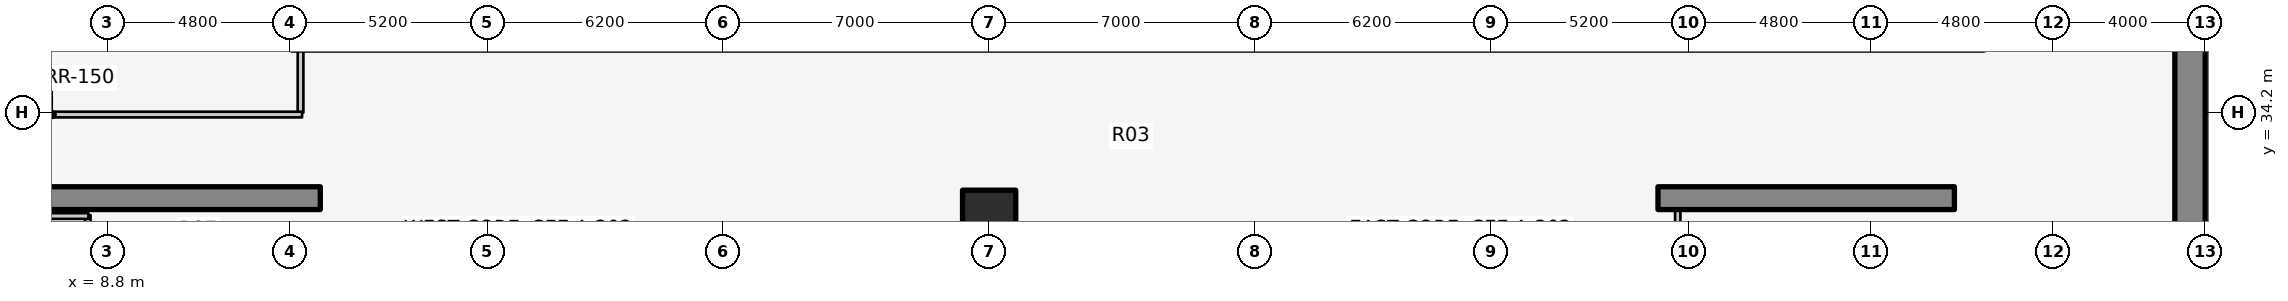
"""IFC4 building model, lengths in metres.
Left out: names, types, materials, properties, quantities, classifications, styles, units other than length and angle.
Written with IfcOpenShell. Run it as: python <this file> out.ifc"""

import sys

from ifc_helpers import new_model, si_unit, direction, frame, frame_2d, origin, origin_2d, place, context, subcontext, project, spatial, rectangle, extrude, element, save


model = new_model("IFC4")
c1 = context("Model", 3, precision=1e-05, world=origin(), true_north=direction((0.0, 1.0)))
c2 = subcontext(c1, "Body", "Model", "MODEL_VIEW")
j1 = project(units=[si_unit("LENGTHUNIT", "METRE"), si_unit("PLANEANGLEUNIT", "RADIAN")], contexts=[c1])
p1 = place(None, origin())
s1 = spatial("IfcSite", under=j1, at=p1, CompositionType="ELEMENT")
p2 = place(p1, origin())
s2 = spatial("IfcBuilding", under=s1, at=p2, CompositionType="ELEMENT")
p3 = place(p2, frame((0.0, 0.0, -5.4)))
s3 = spatial("IfcBuildingStorey", under=s2, at=p3, CompositionType="ELEMENT", Elevation=-5.4)
p4 = place(p3, frame((63.6, 15.6, 0.0), z_axis=(0.0, 0.0, 1.0), x_axis=(0.0, 1.0, 0.0)))
e1 = element("IfcWall", 1, at=p4, inside=s3, PredefinedType="USERDEFINED", context=c2, shape_type="SweptSolid", body=[
    extrude(rectangle(XDim=29.55, YDim=0.8, at=frame_2d((14.775, 0.0))), origin(), (0.0, 0.0, 1.0), 5.4),
])
for number, where, z_axis, x_axis in (
    (2, (6.6, 31.95, 0.0), (0.0, 0.0, 1.0), (1.0, 0.0, 0.0)),
    (3, (49.6, 31.95, 0.0), (0.0, 0.0, 1.0), (1.0, 0.0, 0.0)),
):
    element("IfcWall", number, at=place(p3, frame(where, z_axis=z_axis, x_axis=x_axis)), inside=s3, PredefinedType="SOLIDWALL", context=c2, shape_type="SweptSolid", body=[
        extrude(rectangle(XDim=7.8, YDim=0.6, at=frame_2d((3.9, 0.0))), origin(), (0.0, 0.0, 1.0), 5.4),
    ])
p5 = place(p3, frame((32.0, 31.46, 0.0), z_axis=(0.0, 0.0, 1.0), x_axis=(1.0, 0.0, 0.0)))
e4 = element("IfcColumn", 4, at=p5, inside=s3, PredefinedType="COLUMN", context=c2, shape_type="SweptSolid", body=[
    extrude(rectangle(XDim=1.4, YDim=1.4, at=origin_2d()), origin(), (0.0, 0.0, 1.0), 5.4),
])
p6 = place(p3, frame((13.88, 34.2, 0.0), z_axis=(0.0, 0.0, 1.0), x_axis=(0.0, 1.0, 0.0)))
e5 = element("IfcWall", 5, at=p6, inside=s3, PredefinedType="PARTITIONING", context=c2, shape_type="SweptSolid", body=[
    extrude(rectangle(XDim=11.02, YDim=0.15, at=frame_2d((5.51, 0.0))), origin(), (0.0, 0.0, 1.0), 4.1),
])
p7 = place(p6, frame((2.082, 0.0, 0.0)))
e6 = element("IfcOpeningElement", 6, at=p7, cuts=e5, PredefinedType="OPENING", context=c2, shape_type="SweptSolid", body=[
    extrude(rectangle(XDim=0.85, YDim=2.05, at=frame_2d((0.425, 1.025))), frame((0.0, 0.085, 0.0), z_axis=(0.0, -1.0, 0.0), x_axis=(1.0, 0.0, 0.0)), (0.0, 0.0, 1.0), 0.17),
])
p8 = place(p3, frame((0.78, 34.15, 0.0), z_axis=(0.0, 0.0, 1.0), x_axis=(1.0, 0.0, 0.0)))
e7 = element("IfcWall", 7, at=p8, inside=s3, PredefinedType="PARTITIONING", context=c2, shape_type="SweptSolid", body=[
    extrude(rectangle(XDim=13.14, YDim=0.15, at=frame_2d((6.57, 0.0))), origin(), (0.0, 0.0, 1.0), 4.1),
])
p9 = place(p3, frame((8.28, 25.3, 0.0), z_axis=(0.0, 0.0, 1.0), x_axis=(0.0, 1.0, 0.0)))
e8 = element("IfcWall", 8, at=p9, inside=s3, PredefinedType="PARTITIONING", context=c2, shape_type="SweptSolid", body=[
    extrude(rectangle(XDim=6.2, YDim=0.15, at=frame_2d((3.1, 0.0))), origin(), (0.0, 0.0, 1.0), 5.055),
])
p10 = place(p9, frame((2.5, 0.0, 0.0)))
e9 = element("IfcOpeningElement", 9, at=p10, cuts=e8, PredefinedType="OPENING", context=c2, shape_type="SweptSolid", body=[
    extrude(rectangle(XDim=0.85, YDim=2.05, at=frame_2d((0.425, 1.025))), frame((0.0, 0.085, 0.0), z_axis=(0.0, -1.0, 0.0), x_axis=(1.0, 0.0, 0.0)), (0.0, 0.0, 1.0), 0.17),
])
p11 = place(p3, frame((0.78, 31.48, 0.0), z_axis=(0.0, 0.0, 1.0), x_axis=(1.0, 0.0, 0.0)))
e10 = element("IfcWall", 10, at=p11, inside=s3, PredefinedType="PARTITIONING", context=c2, shape_type="SweptSolid", body=[
    extrude(rectangle(XDim=7.52, YDim=0.15, at=frame_2d((3.76, 0.0))), origin(), (0.0, 0.0, 1.0), 4.1),
])
p12 = place(p3, frame((50.12, 17.7, 0.0), z_axis=(0.0, 0.0, 1.0), x_axis=(0.0, 1.0, 0.0)))
e11 = element("IfcWall", 11, at=p12, inside=s3, PredefinedType="PLUMBINGWALL", context=c2, shape_type="SweptSolid", body=[
    extrude(rectangle(XDim=13.92, YDim=0.14, at=frame_2d((6.96, 0.0))), origin(), (0.0, 0.0, 1.0), 4.1),
])
save(model, sys.argv[1])
